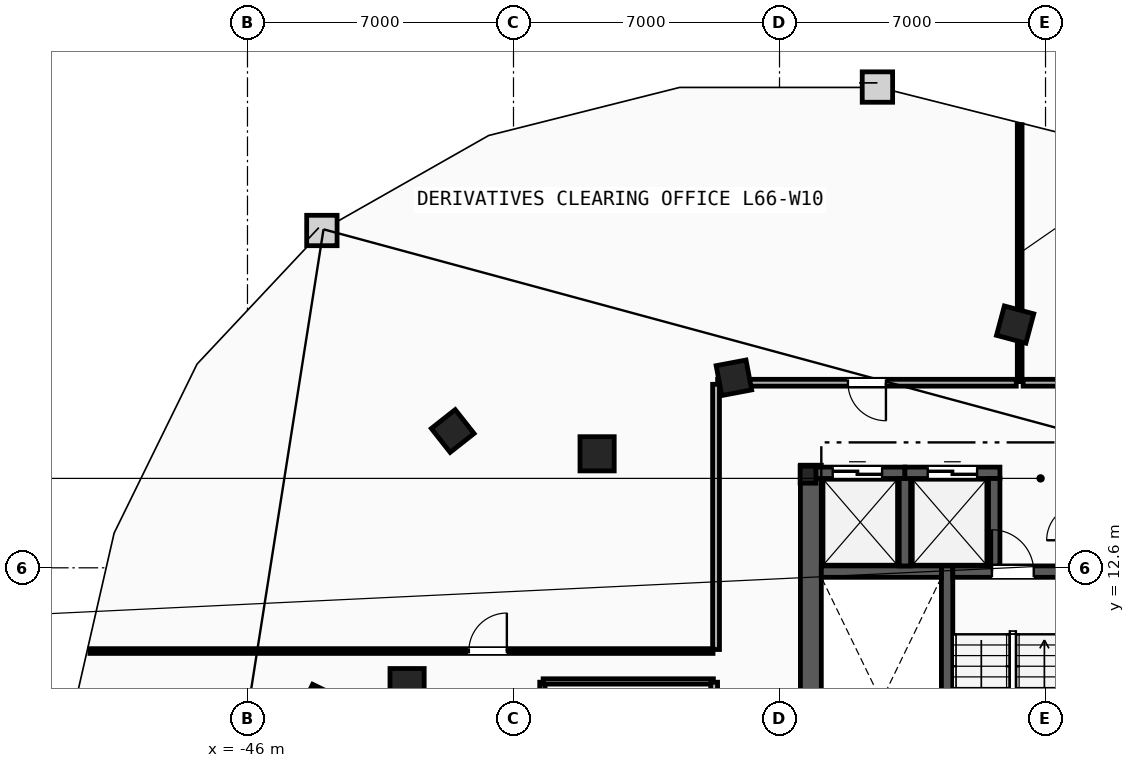
"""IFC4 building model, lengths in metres.
Left out: names, types, materials, properties, quantities, classifications, styles, units other than length and angle.
Written with IfcOpenShell. Run it as: python <this file> out.ifc"""

import sys

from ifc_helpers import new_model, si_unit, direction, frame, frame_2d, origin, origin_2d, place, context, subcontext, project, spatial, rectangle, i_section, extrude, element, fill, save


model = new_model("IFC4")
c1 = context("Model", 3, precision=1e-05, world=origin(), true_north=direction((0.0, 1.0)))
c2 = subcontext(c1, "Body", "Model", "MODEL_VIEW")
j1 = project(units=[si_unit("LENGTHUNIT", "METRE"), si_unit("PLANEANGLEUNIT", "RADIAN")], contexts=[c1])
p1 = place(None, origin())
s1 = spatial("IfcSite", under=j1, at=p1, CompositionType="ELEMENT")
p2 = place(p1, origin())
s2 = spatial("IfcBuilding", under=s1, at=p2, CompositionType="ELEMENT")
p3 = place(p2, frame((0.0, 0.0, 250.4)))
s3 = spatial("IfcBuildingStorey", under=s2, at=p3, CompositionType="ELEMENT", Elevation=250.4)
p4 = place(p3, frame((-31.25, 15.05, 0.0), z_axis=(0.0, 0.0, 1.0), x_axis=(1.0, 0.0, 0.0)))
e1 = element("IfcColumn", 1, at=p4, inside=s3, PredefinedType="COLUMN", context=c2, shape_type="SweptSolid", body=[
    extrude(i_section(OverallWidth=0.416, OverallDepth=0.446, WebThickness=0.039, FlangeThickness=0.063, FilletRadius=0.018, at=origin_2d()), origin(), (0.0, 0.0, 1.0), 3.6),
])
for number, where, z_axis, x_axis in (
    (2, (-41.8, 9.5, 0.0), (0.0, 0.0, 1.0), (1.0, 0.0, 0.0)),
    (3, (-36.8, 15.6, 0.0), (0.0, 0.0, 1.0), (1.0, 0.0, 0.0)),
):
    element("IfcColumn", number, at=place(p3, frame(where, z_axis=z_axis, x_axis=x_axis)), inside=s3, PredefinedType="COLUMN", context=c2, shape_type="SweptSolid", body=[
        extrude(rectangle(XDim=0.9, YDim=0.9, at=origin_2d()), origin(), (0.0, 0.0, 1.0), 3.6),
    ])
for number, where, z_axis, x_axis in (
    (4, (-25.8, 19.0, 0.0), (0.0, 0.0, 1.0), (-0.966, 0.259, 0.0)),
    (5, (-33.2, 17.6, 0.0), (0.0, 0.0, 1.0), (-0.983, -0.186, 0.0)),
    (6, (-40.6, 16.2, 0.0), (0.0, 0.0, 1.0), (-0.785, -0.619, 0.0)),
    (7, (-44.1, 9.0, 0.0), (0.0, 0.0, 1.0), (-0.437, -0.899, 0.0)),
):
    element("IfcColumn", number, at=place(p3, frame(where, z_axis=z_axis, x_axis=x_axis)), inside=s3, PredefinedType="COLUMN", context=c2, shape_type="SweptSolid", body=[
        extrude(rectangle(XDim=0.8, YDim=0.8, at=origin_2d()), origin(), (0.0, 0.0, 1.0), 3.6),
    ])
p5 = place(p3, frame((-31.175, 1.97, 0.0), z_axis=(0.0, 0.0, 1.0), x_axis=(0.0, 1.0, 0.0)))
e8 = element("IfcWall", 8, at=p5, inside=s3, PredefinedType="SHEAR", context=c2, shape_type="SweptSolid", body=[
    extrude(rectangle(XDim=13.33, YDim=0.55, at=frame_2d((6.665, 0.0))), origin(), (0.0, 0.0, 1.0), 3.34),
])
p6 = place(p3, frame((-27.59, 1.97, 0.0), z_axis=(0.0, 0.0, 1.0), x_axis=(0.0, 1.0, 0.0)))
e9 = element("IfcWall", 9, at=p6, inside=s3, PredefinedType="SHEAR", context=c2, shape_type="SweptSolid", body=[
    extrude(rectangle(XDim=10.68, YDim=0.3, at=frame_2d((5.34, 0.0))), origin(), (0.0, 0.0, 1.0), 3.34),
])
p7 = place(p3, frame((-30.9, 12.5, 0.0), z_axis=(0.0, 0.0, 1.0), x_axis=(1.0, 0.0, 0.0)))
e10 = element("IfcWall", 10, at=p7, inside=s3, PredefinedType="SHEAR", context=c2, shape_type="SweptSolid", body=[
    extrude(rectangle(XDim=3.16, YDim=0.3, at=frame_2d((1.58, 0.0))), origin(), (0.0, 0.0, 1.0), 3.34),
])
p8 = place(p3, frame((-27.44, 12.5, 0.0), z_axis=(0.0, 0.0, 1.0), x_axis=(1.0, 0.0, 0.0)))
e11 = element("IfcWall", 11, at=p8, inside=s3, PredefinedType="SHEAR", context=c2, shape_type="SweptSolid", body=[
    extrude(rectangle(XDim=3.16, YDim=0.3, at=frame_2d((1.58, 0.0))), origin(), (0.0, 0.0, 1.0), 3.34),
])
p9 = place(p8, frame((1.03, 0.0, 0.0)))
e12 = element("IfcOpeningElement", 12, at=p9, cuts=e11, PredefinedType="OPENING", context=c2, shape_type="SweptSolid", body=[
    extrude(rectangle(XDim=1.1, YDim=2.15, at=frame_2d((0.55, 1.075))), frame((0.0, 0.16, 0.0), z_axis=(0.0, -1.0, 0.0), x_axis=(1.0, 0.0, 0.0)), (0.0, 0.0, 1.0), 0.32),
])
p10 = place(p3, frame((-31.2, 15.1, 0.0), z_axis=(0.0, 0.0, 1.0), x_axis=(1.0, 0.0, 0.0)))
e13 = element("IfcWall", 13, at=p10, inside=s3, PredefinedType="SHEAR", context=c2, shape_type="SweptSolid", body=[
    extrude(rectangle(XDim=2.5, YDim=0.3, at=frame_2d((1.25, 0.0))), origin(), (0.0, 0.0, 1.0), 3.34),
])
p11 = place(p10, frame((0.6, 0.0, 0.0)))
e14 = element("IfcOpeningElement", 14, at=p11, cuts=e13, PredefinedType="OPENING", context=c2, shape_type="SweptSolid", body=[
    extrude(rectangle(XDim=1.3, YDim=2.2, at=frame_2d((0.65, 1.1))), frame((0.0, 0.16, 0.0), z_axis=(0.0, -1.0, 0.0), x_axis=(1.0, 0.0, 0.0)), (0.0, 0.0, 1.0), 0.32),
])
p12 = place(p3, frame((-28.7, 12.65, 0.0), z_axis=(0.0, 0.0, 1.0), x_axis=(0.0, 1.0, 0.0)))
e15 = element("IfcWall", 15, at=p12, inside=s3, PredefinedType="SHEAR", context=c2, shape_type="SweptSolid", body=[
    extrude(rectangle(XDim=2.3, YDim=0.3, at=frame_2d((1.15, 0.0))), origin(), (0.0, 0.0, 1.0), 3.34),
])
p13 = place(p3, frame((-28.7, 15.1, 0.0), z_axis=(0.0, 0.0, 1.0), x_axis=(1.0, 0.0, 0.0)))
e16 = element("IfcWall", 16, at=p13, inside=s3, PredefinedType="SHEAR", context=c2, shape_type="SweptSolid", body=[
    extrude(rectangle(XDim=2.5, YDim=0.3, at=frame_2d((1.25, 0.0))), origin(), (0.0, 0.0, 1.0), 3.34),
])
p14 = place(p13, frame((0.6, 0.0, 0.0)))
e17 = element("IfcOpeningElement", 17, at=p14, cuts=e16, PredefinedType="OPENING", context=c2, shape_type="SweptSolid", body=[
    extrude(rectangle(XDim=1.3, YDim=2.2, at=frame_2d((0.65, 1.1))), frame((0.0, 0.16, 0.0), z_axis=(0.0, -1.0, 0.0), x_axis=(1.0, 0.0, 0.0)), (0.0, 0.0, 1.0), 0.32),
])
p15 = place(p3, frame((-26.35, 12.65, 0.0), z_axis=(0.0, 0.0, 1.0), x_axis=(0.0, 1.0, 0.0)))
e18 = element("IfcWall", 18, at=p15, inside=s3, PredefinedType="SHEAR", context=c2, shape_type="SweptSolid", body=[
    extrude(rectangle(XDim=2.3, YDim=0.3, at=frame_2d((1.15, 0.0))), origin(), (0.0, 0.0, 1.0), 3.34),
])
p16 = place(p3, frame((-38.24, 5.415, 0.0), z_axis=(0.0, 0.0, 1.0), x_axis=(0.0, 1.0, 0.0)))
e19 = element("IfcWall", 19, at=p16, inside=s3, PredefinedType="PARTITIONING", context=c2, shape_type="SweptSolid", body=[
    extrude(rectangle(XDim=4.175, YDim=0.14, at=frame_2d((2.087, 0.0))), origin(), (0.0, 0.0, 1.0), 3.34),
])
p17 = place(p3, frame((-38.22, 9.61, 0.0), z_axis=(0.0, 0.0, 1.0), x_axis=(1.0, 0.0, 0.0)))
e20 = element("IfcWall", 20, at=p17, inside=s3, PredefinedType="PARTITIONING", context=c2, shape_type="SweptSolid", body=[
    extrude(rectangle(XDim=4.48, YDim=0.14, at=frame_2d((2.24, 0.0))), origin(), (0.0, 0.0, 1.0), 3.34),
])
p18 = place(p3, frame((-33.72, 5.43, 0.0), z_axis=(0.0, 0.0, 1.0), x_axis=(0.0, 1.0, 0.0)))
e21 = element("IfcWall", 21, at=p18, inside=s3, PredefinedType="PARTITIONING", context=c2, shape_type="SweptSolid", body=[
    extrude(rectangle(XDim=4.16, YDim=0.18, at=frame_2d((2.08, 0.0))), origin(), (0.0, 0.0, 1.0), 3.34),
])
p19 = place(p18, frame((1.58, 0.0, 0.0)))
e22 = element("IfcOpeningElement", 22, at=p19, cuts=e21, PredefinedType="OPENING", context=c2, shape_type="SweptSolid", body=[
    extrude(rectangle(XDim=1.0, YDim=2.15, at=frame_2d((0.5, 1.075))), frame((0.0, 0.1, 0.0), z_axis=(0.0, -1.0, 0.0), x_axis=(1.0, 0.0, 0.0)), (0.0, 0.0, 1.0), 0.2),
])
p20 = place(p3, frame((-25.68, 17.5, 0.0), z_axis=(0.0, 0.0, 1.0), x_axis=(0.0, 1.0, 0.0)))
e23 = element("IfcWall", 23, at=p20, inside=s3, PredefinedType="PARTITIONING", context=c2, shape_type="SweptSolid", body=[
    extrude(rectangle(XDim=6.76, YDim=0.125, at=frame_2d((3.38, 0.0))), origin(), (0.0, 0.0, 1.0), 3.34),
])
p21 = place(p3, frame((-21.122, 17.47, 0.0), z_axis=(0.0, 0.0, 1.0), x_axis=(-1.0, 0.0, 0.0)))
e24 = element("IfcWall", 24, at=p21, inside=s3, PredefinedType="PARTITIONING", context=c2, shape_type="SweptSolid", body=[
    extrude(rectangle(XDim=4.469, YDim=0.18, at=frame_2d((2.234, 0.0))), origin(), (0.0, 0.0, 1.0), 3.34),
])
p22 = place(p21, frame((1.734, 0.0, 0.0)))
e25 = element("IfcOpeningElement", 25, at=p22, cuts=e24, PredefinedType="OPENING", context=c2, shape_type="SweptSolid", body=[
    extrude(rectangle(XDim=1.0, YDim=2.15, at=frame_2d((0.5, 1.075))), frame((0.0, 0.1, 0.0), z_axis=(0.0, -1.0, 0.0), x_axis=(1.0, 0.0, 0.0)), (0.0, 0.0, 1.0), 0.2),
])
p23 = place(p3, frame((-25.77, 17.47, 0.0), z_axis=(0.0, 0.0, 1.0), x_axis=(-1.0, 0.0, 0.0)))
e26 = element("IfcWall", 26, at=p23, inside=s3, PredefinedType="PARTITIONING", context=c2, shape_type="SweptSolid", body=[
    extrude(rectangle(XDim=7.858, YDim=0.18, at=frame_2d((3.929, 0.0))), origin(), (0.0, 0.0, 1.0), 3.34),
])
p24 = place(p23, frame((3.429, 0.0, 0.0)))
e27 = element("IfcOpeningElement", 27, at=p24, cuts=e26, PredefinedType="OPENING", context=c2, shape_type="SweptSolid", body=[
    extrude(rectangle(XDim=1.0, YDim=2.15, at=frame_2d((0.5, 1.075))), frame((0.0, 0.1, 0.0), z_axis=(0.0, -1.0, 0.0), x_axis=(1.0, 0.0, 0.0)), (0.0, 0.0, 1.0), 0.2),
])
p25 = place(p3, frame((-33.67, 17.428, 0.0), z_axis=(0.0, 0.0, 1.0), x_axis=(0.0, -1.0, 0.0)))
e28 = element("IfcWall", 28, at=p25, inside=s3, PredefinedType="PARTITIONING", context=c2, shape_type="SweptSolid", body=[
    extrude(rectangle(XDim=6.979, YDim=0.18, at=frame_2d((3.489, 0.0))), origin(), (0.0, 0.0, 1.0), 3.34),
])
p26 = place(p3, frame((-50.146, 10.41, 0.0), z_axis=(0.0, 0.0, 1.0), x_axis=(1.0, 0.0, 0.0)))
e29 = element("IfcWall", 29, at=p26, inside=s3, PredefinedType="PARTITIONING", context=c2, shape_type="SweptSolid", body=[
    extrude(rectangle(XDim=16.396, YDim=0.125, at=frame_2d((8.198, 0.0))), origin(), (0.0, 0.0, 1.0), 3.34),
])
p27 = place(p26, frame((9.971, 0.0, 0.0)))
e30 = element("IfcOpeningElement", 30, at=p27, cuts=e29, PredefinedType="OPENING", context=c2, shape_type="SweptSolid", body=[
    extrude(rectangle(XDim=1.0, YDim=2.15, at=frame_2d((0.5, 1.075))), frame((0.0, 0.073, 0.0), z_axis=(0.0, -1.0, 0.0), x_axis=(1.0, 0.0, 0.0)), (0.0, 0.0, 1.0), 0.145),
])
p28 = place(p9, origin())
e31 = element("IfcDoor", 31, at=p28, inside=s3, OperationType="SINGLE_SWING_LEFT", PredefinedType="DOOR", context=c2, shape_type="SweptSolid", body=[
    extrude(rectangle(XDim=1.1, YDim=2.15, at=frame_2d((0.55, 1.075))), frame((0.0, 0.025, 0.0), z_axis=(0.0, -1.0, 0.0), x_axis=(1.0, 0.0, 0.0)), (0.0, 0.0, 1.0), 0.05),
])
fill(e12, e31)
p29 = place(p11, origin())
e32 = element("IfcDoor", 32, at=p29, inside=s3, OperationType="SLIDING_TO_LEFT", PredefinedType="TRAPDOOR", context=c2, shape_type="SweptSolid", body=[
    extrude(rectangle(XDim=1.3, YDim=2.2, at=frame_2d((0.65, 1.1))), frame((0.0, 0.025, 0.0), z_axis=(0.0, -1.0, 0.0), x_axis=(1.0, 0.0, 0.0)), (0.0, 0.0, 1.0), 0.05),
])
fill(e14, e32)
p30 = place(p14, origin())
e33 = element("IfcDoor", 33, at=p30, inside=s3, OperationType="SLIDING_TO_LEFT", PredefinedType="TRAPDOOR", context=c2, shape_type="SweptSolid", body=[
    extrude(rectangle(XDim=1.3, YDim=2.2, at=frame_2d((0.65, 1.1))), frame((0.0, 0.025, 0.0), z_axis=(0.0, -1.0, 0.0), x_axis=(1.0, 0.0, 0.0)), (0.0, 0.0, 1.0), 0.05),
])
fill(e17, e33)
p31 = place(p27, origin())
e34 = element("IfcDoor", 34, at=p31, inside=s3, OperationType="SINGLE_SWING_RIGHT", PredefinedType="DOOR", context=c2, shape_type="SweptSolid", body=[
    extrude(rectangle(XDim=1.0, YDim=2.15, at=frame_2d((0.5, 1.075))), frame((0.0, 0.025, 0.0), z_axis=(0.0, -1.0, 0.0), x_axis=(1.0, 0.0, 0.0)), (0.0, 0.0, 1.0), 0.05),
])
fill(e30, e34)
p32 = place(p24, origin())
e35 = element("IfcDoor", 35, at=p32, inside=s3, OperationType="SINGLE_SWING_LEFT", PredefinedType="DOOR", context=c2, shape_type="SweptSolid", body=[
    extrude(rectangle(XDim=1.0, YDim=2.15, at=frame_2d((0.5, 1.075))), frame((0.0, 0.025, 0.0), z_axis=(0.0, -1.0, 0.0), x_axis=(1.0, 0.0, 0.0)), (0.0, 0.0, 1.0), 0.05),
])
fill(e27, e35)
save(model, sys.argv[1])
